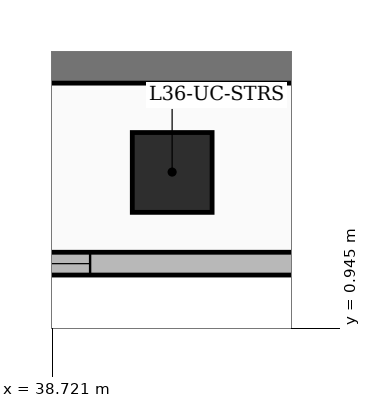
"""IFC4 building model, lengths in metres.
Left out: names, types, materials, properties, quantities, classifications, styles, units other than length and angle.
Written with IfcOpenShell. Run it as: python <this file> out.ifc"""

import sys

from ifc_helpers import new_model, si_unit, direction, frame, frame_2d, origin, origin_2d, place, context, subcontext, project, spatial, rectangle, extrude, element, fill, save


model = new_model("IFC4")
c1 = context("Model", 3, precision=1e-05, world=origin(), true_north=direction((0.0, 1.0)))
c2 = subcontext(c1, "Body", "Model", "MODEL_VIEW")
j1 = project(units=[si_unit("LENGTHUNIT", "METRE"), si_unit("PLANEANGLEUNIT", "RADIAN")], contexts=[c1])
p1 = place(None, origin())
s1 = spatial("IfcSite", under=j1, at=p1, CompositionType="ELEMENT")
p2 = place(p1, origin())
s2 = spatial("IfcBuilding", under=s1, at=p2, CompositionType="ELEMENT")
p3 = place(p2, frame((0.0, 0.0, 142.8)))
s3 = spatial("IfcBuildingStorey", under=s2, at=p3, CompositionType="ELEMENT", Elevation=142.8)
p4 = place(p3, frame((35.75, 4.55, 0.0), z_axis=(0.0, 0.0, 1.0), x_axis=(1.0, 0.0, 0.0)))
e1 = element("IfcWall", 1, at=p4, inside=s3, PredefinedType="SHEAR", context=c2, shape_type="SweptSolid", body=[
    extrude(rectangle(XDim=10.7, YDim=0.75, at=frame_2d((5.35, 0.0))), origin(), (0.0, 0.0, 1.0), 3.6),
])
p5 = place(p3, frame((40.296, 3.0, 0.0), z_axis=(0.0, 0.0, 1.0), x_axis=(1.0, 0.0, 0.0)))
e2 = element("IfcColumn", 2, at=p5, inside=s3, PredefinedType="COLUMN", context=c2, shape_type="SweptSolid", body=[
    extrude(rectangle(XDim=1.05, YDim=1.05, at=origin_2d()), origin(), (0.0, 0.0, 1.0), 3.6),
])
p6 = place(p3, frame((42.316, 1.8, 0.0), z_axis=(0.0, 0.0, 1.0), x_axis=(-1.0, 0.0, 0.0)))
e3 = element("IfcWall", 3, at=p6, inside=s3, PredefinedType="SOLIDWALL", context=c2, shape_type="SweptSolid", body=[
    extrude(rectangle(XDim=7.812, YDim=0.3, at=frame_2d((3.906, 0.0))), origin(), (0.0, 0.0, 1.0), 3.35),
])
p7 = place(p6, frame((3.1, 0.0, 0.55)))
e4 = element("IfcOpeningElement", 4, at=p7, cuts=e3, PredefinedType="OPENING", context=c2, shape_type="SweptSolid", body=[
    extrude(rectangle(XDim=1.6, YDim=2.2, at=frame_2d((0.8, 1.1))), frame((0.0, 0.16, 0.0), z_axis=(0.0, -1.0, 0.0), x_axis=(1.0, 0.0, 0.0)), (0.0, 0.0, 1.0), 0.32),
])
p8 = place(p7, origin())
e5 = element("IfcWindow", 5, at=p8, inside=s3, PartitioningType="SINGLE_PANEL", PredefinedType="WINDOW", context=c2, shape_type="SweptSolid", body=[
    extrude(rectangle(XDim=1.6, YDim=2.2, at=frame_2d((0.8, 1.1))), frame((0.0, 0.03, 0.0), z_axis=(0.0, -1.0, 0.0), x_axis=(1.0, 0.0, 0.0)), (0.0, 0.0, 1.0), 0.06),
])
fill(e4, e5)
save(model, sys.argv[1])
